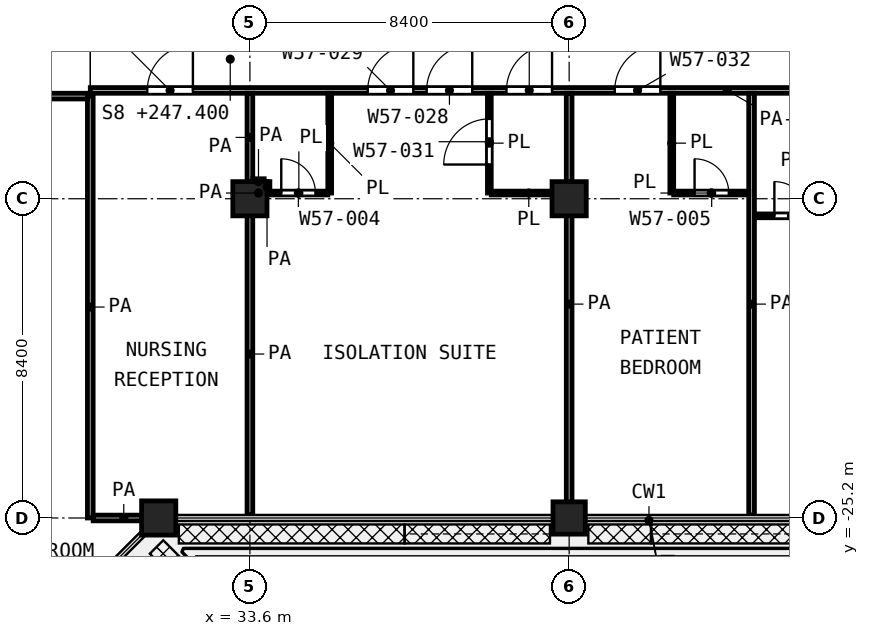
"""IFC4 building model, lengths in metres.
Left out: names, types, materials, properties, quantities, classifications, styles, units other than length and angle.
Written with IfcOpenShell. Run it as: python <this file> out.ifc"""

import sys

from ifc_helpers import new_model, si_unit, direction, frame, frame_2d, origin, origin_2d, place, context, subcontext, project, spatial, rectangle, extrude, element, fill, save


model = new_model("IFC4")
c1 = context("Model", 3, precision=1e-05, world=origin(), true_north=direction((0.0, 1.0)))
c2 = subcontext(c1, "Body", "Model", "MODEL_VIEW")
j1 = project(units=[si_unit("LENGTHUNIT", "METRE"), si_unit("PLANEANGLEUNIT", "RADIAN")], contexts=[c1])
p1 = place(None, origin())
s1 = spatial("IfcSite", under=j1, at=p1, CompositionType="ELEMENT")
p2 = place(p1, origin())
s2 = spatial("IfcBuilding", under=s1, at=p2, CompositionType="ELEMENT")
p3 = place(p2, frame((0.0, 0.0, 247.4)))
s3 = spatial("IfcBuildingStorey", under=s2, at=p3, CompositionType="ELEMENT", Elevation=247.4)
for number, where, z_axis, x_axis in (
    (1, (33.6, -16.8, 0.0), (0.0, 0.0, 1.0), (1.0, 0.0, 0.0)),
    (2, (42.0, -16.8, 0.0), (0.0, 0.0, 1.0), (1.0, 0.0, 0.0)),
    (3, (31.2, -25.2, 0.0), (0.0, 0.0, 1.0), (1.0, 0.0, 0.0)),
):
    element("IfcColumn", number, at=place(p3, frame(where, z_axis=z_axis, x_axis=x_axis)), inside=s3, PredefinedType="COLUMN", context=c2, shape_type="SweptSolid", body=[
        extrude(rectangle(XDim=0.9, YDim=0.9, at=origin_2d()), origin(), (0.0, 0.0, 1.0), 4.2),
    ])
p4 = place(p3, frame((42.0, -25.2, 0.0), z_axis=(0.0, 0.0, 1.0), x_axis=(1.0, 0.0, 0.0)))
e4 = element("IfcColumn", 4, at=p4, inside=s3, PredefinedType="COLUMN", context=c2, shape_type="SweptSolid", body=[
    extrude(rectangle(XDim=0.85, YDim=0.85, at=origin_2d()), origin(), (0.0, 0.0, 1.0), 4.2),
])
p5 = place(p3, frame((46.875, -17.25, 0.0), z_axis=(0.0, 0.0, 1.0), x_axis=(1.0, 0.0, 0.0)))
e5 = element("IfcWall", 5, at=p5, inside=s3, PredefinedType="PARTITIONING", context=c2, shape_type="SweptSolid", body=[
    extrude(rectangle(XDim=1.975, YDim=0.1, at=frame_2d((0.988, 0.0))), origin(), (0.0, 0.0, 1.0), 3.6),
])
p6 = place(p5, frame((0.525, 0.0, 0.0)))
e6 = element("IfcOpeningElement", 6, at=p6, cuts=e5, PredefinedType="OPENING", context=c2, shape_type="SweptSolid", body=[
    extrude(rectangle(XDim=0.9, YDim=2.1, at=frame_2d((0.45, 1.05))), frame((0.0, 0.06, 0.0), z_axis=(0.0, -1.0, 0.0), x_axis=(1.0, 0.0, 0.0)), (0.0, 0.0, 1.0), 0.12),
])
p7 = place(p3, frame((34.125, -16.65, 0.0), z_axis=(0.0, 0.0, 1.0), x_axis=(1.0, 0.0, 0.0)))
e7 = element("IfcWall", 7, at=p7, inside=s3, PredefinedType="PARTITIONING", context=c2, shape_type="SweptSolid", body=[
    extrude(rectangle(XDim=1.525, YDim=0.1, at=frame_2d((0.762, 0.0))), origin(), (0.0, 0.0, 1.0), 3.6),
])
p8 = place(p7, frame((0.3, 0.0, 0.0)))
e8 = element("IfcOpeningElement", 8, at=p8, cuts=e7, PredefinedType="OPENING", context=c2, shape_type="SweptSolid", body=[
    extrude(rectangle(XDim=0.9, YDim=2.1, at=frame_2d((0.45, 1.05))), frame((0.0, 0.06, 0.0), z_axis=(0.0, -1.0, 0.0), x_axis=(1.0, 0.0, 0.0)), (0.0, 0.0, 1.0), 0.12),
])
p9 = place(p3, frame((39.95, -16.65, 0.0), z_axis=(0.0, 0.0, 1.0), x_axis=(1.0, 0.0, 0.0)))
e9 = element("IfcWall", 9, at=p9, inside=s3, PredefinedType="PARTITIONING", context=c2, shape_type="SweptSolid", body=[
    extrude(rectangle(XDim=1.975, YDim=0.1, at=frame_2d((0.988, 0.0))), origin(), (0.0, 0.0, 1.0), 3.6),
])
p10 = place(p3, frame((44.75, -16.65, 0.0), z_axis=(0.0, 0.0, 1.0), x_axis=(1.0, 0.0, 0.0)))
e10 = element("IfcWall", 10, at=p10, inside=s3, PredefinedType="PARTITIONING", context=c2, shape_type="SweptSolid", body=[
    extrude(rectangle(XDim=1.975, YDim=0.1, at=frame_2d((0.988, 0.0))), origin(), (0.0, 0.0, 1.0), 3.6),
])
p11 = place(p10, frame((0.55, 0.0, 0.0)))
e11 = element("IfcOpeningElement", 11, at=p11, cuts=e10, PredefinedType="OPENING", context=c2, shape_type="SweptSolid", body=[
    extrude(rectangle(XDim=0.9, YDim=2.1, at=frame_2d((0.45, 1.05))), frame((0.0, 0.06, 0.0), z_axis=(0.0, -1.0, 0.0), x_axis=(1.0, 0.0, 0.0)), (0.0, 0.0, 1.0), 0.12),
])
p12 = place(p3, frame((35.7, -16.65, 0.0), z_axis=(0.0, 0.0, 1.0), x_axis=(0.0, 1.0, 0.0)))
e12 = element("IfcWall", 12, at=p12, inside=s3, PredefinedType="PARTITIONING", context=c2, shape_type="SweptSolid", body=[
    extrude(rectangle(XDim=2.625, YDim=0.1, at=frame_2d((1.312, 0.0))), origin(), (0.0, 0.0, 1.0), 3.6),
])
p13 = place(p3, frame((39.9, -16.65, 0.0), z_axis=(0.0, 0.0, 1.0), x_axis=(0.0, 1.0, 0.0)))
e13 = element("IfcWall", 13, at=p13, inside=s3, PredefinedType="PARTITIONING", context=c2, shape_type="SweptSolid", body=[
    extrude(rectangle(XDim=2.625, YDim=0.1, at=frame_2d((1.312, 0.0))), origin(), (0.0, 0.0, 1.0), 3.6),
])
p14 = place(p13, frame((0.75, 0.0, 0.0)))
e14 = element("IfcOpeningElement", 14, at=p14, cuts=e13, PredefinedType="OPENING", context=c2, shape_type="SweptSolid", body=[
    extrude(rectangle(XDim=1.2, YDim=2.1, at=frame_2d((0.6, 1.05))), frame((0.0, 0.06, 0.0), z_axis=(0.0, -1.0, 0.0), x_axis=(1.0, 0.0, 0.0)), (0.0, 0.0, 1.0), 0.12),
])
p15 = place(p3, frame((44.7, -16.65, 0.0), z_axis=(0.0, 0.0, 1.0), x_axis=(0.0, 1.0, 0.0)))
e15 = element("IfcWall", 15, at=p15, inside=s3, PredefinedType="PARTITIONING", context=c2, shape_type="SweptSolid", body=[
    extrude(rectangle(XDim=2.625, YDim=0.1, at=frame_2d((1.312, 0.0))), origin(), (0.0, 0.0, 1.0), 3.6),
])
p16 = place(p3, frame((29.475, -25.2, 0.0), z_axis=(0.0, 0.0, 1.0), x_axis=(1.0, 0.0, 0.0)))
e16 = element("IfcWall", 16, at=p16, inside=s3, PredefinedType="PARTITIONING", context=c2, shape_type="SweptSolid", body=[
    extrude(rectangle(XDim=1.612, YDim=0.15, at=frame_2d((0.806, 0.0))), origin(), (0.0, 0.0, 1.0), 3.6),
])
for number, where, z_axis, x_axis in (
    (17, (33.677, -16.65, 0.0), (0.0, 0.0, 1.0), (1.0, 0.0, 0.0)),
    (18, (33.677, -16.35, 0.0), (0.0, 0.0, 1.0), (1.0, 0.0, 0.0)),
):
    element("IfcWall", number, at=place(p3, frame(where, z_axis=z_axis, x_axis=x_axis)), inside=s3, PredefinedType="PARTITIONING", context=c2, shape_type="SweptSolid", body=[
        extrude(rectangle(XDim=0.298, YDim=0.15, at=frame_2d((0.149, 0.0))), origin(), (0.0, 0.0, 1.0), 3.6),
    ])
p17 = place(p3, frame((24.8, -14.1, 0.0), z_axis=(0.0, 0.0, 1.0), x_axis=(1.0, 0.0, 0.0)))
e19 = element("IfcWall", 19, at=p17, inside=s3, PredefinedType="PARTITIONING", context=c2, shape_type="SweptSolid", body=[
    extrude(rectangle(XDim=4.525, YDim=0.15, at=frame_2d((2.262, 0.0))), origin(), (0.0, 0.0, 1.0), 3.6),
])
p18 = place(p17, frame((1.75, 0.0, 0.0)))
e20 = element("IfcOpeningElement", 20, at=p18, cuts=e19, PredefinedType="OPENING", context=c2, shape_type="SweptSolid", body=[
    extrude(rectangle(XDim=1.5, YDim=2.1, at=frame_2d((0.75, 1.05))), frame((0.0, 0.085, 0.0), z_axis=(0.0, -1.0, 0.0), x_axis=(1.0, 0.0, 0.0)), (0.0, 0.0, 1.0), 0.17),
])
p19 = place(p3, frame((29.4, -13.95, 0.0), z_axis=(0.0, 0.0, 1.0), x_axis=(1.0, 0.0, 0.0)))
e21 = element("IfcWall", 21, at=p19, inside=s3, PredefinedType="PARTITIONING", context=c2, shape_type="SweptSolid", body=[
    extrude(rectangle(XDim=33.52, YDim=0.15, at=frame_2d((16.76, 0.0))), origin(), (0.0, 0.0, 1.0), 2.7),
])
p20 = place(p19, frame((1.5, 0.0, 0.0)))
e22 = element("IfcOpeningElement", 22, at=p20, cuts=e21, PredefinedType="OPENING", context=c2, shape_type="SweptSolid", body=[
    extrude(rectangle(XDim=1.2, YDim=2.1, at=frame_2d((0.6, 1.05))), frame((0.0, 0.085, 0.0), z_axis=(0.0, -1.0, 0.0), x_axis=(1.0, 0.0, 0.0)), (0.0, 0.0, 1.0), 0.17),
])
p21 = place(p19, frame((8.85, 0.0, 0.0)))
e23 = element("IfcOpeningElement", 23, at=p21, cuts=e21, PredefinedType="OPENING", context=c2, shape_type="SweptSolid", body=[
    extrude(rectangle(XDim=1.2, YDim=2.1, at=frame_2d((0.6, 1.05))), frame((0.0, 0.085, 0.0), z_axis=(0.0, -1.0, 0.0), x_axis=(1.0, 0.0, 0.0)), (0.0, 0.0, 1.0), 0.17),
])
p22 = place(p19, frame((7.3, 0.0, 0.0)))
e24 = element("IfcOpeningElement", 24, at=p22, cuts=e21, PredefinedType="OPENING", context=c2, shape_type="SweptSolid", body=[
    extrude(rectangle(XDim=1.2, YDim=2.1, at=frame_2d((0.6, 1.05))), frame((0.0, 0.085, 0.0), z_axis=(0.0, -1.0, 0.0), x_axis=(1.0, 0.0, 0.0)), (0.0, 0.0, 1.0), 0.17),
])
p23 = place(p19, frame((10.95, 0.0, 0.0)))
e25 = element("IfcOpeningElement", 25, at=p23, cuts=e21, PredefinedType="OPENING", context=c2, shape_type="SweptSolid", body=[
    extrude(rectangle(XDim=1.2, YDim=2.1, at=frame_2d((0.6, 1.05))), frame((0.0, 0.085, 0.0), z_axis=(0.0, -1.0, 0.0), x_axis=(1.0, 0.0, 0.0)), (0.0, 0.0, 1.0), 0.17),
])
p24 = place(p19, frame((13.8, 0.0, 0.0)))
e26 = element("IfcOpeningElement", 26, at=p24, cuts=e21, PredefinedType="OPENING", context=c2, shape_type="SweptSolid", body=[
    extrude(rectangle(XDim=1.2, YDim=2.1, at=frame_2d((0.6, 1.05))), frame((0.0, 0.085, 0.0), z_axis=(0.0, -1.0, 0.0), x_axis=(1.0, 0.0, 0.0)), (0.0, 0.0, 1.0), 0.17),
])
p25 = place(p19, frame((19.7, 0.0, 0.0)))
e27 = element("IfcOpeningElement", 27, at=p25, cuts=e21, PredefinedType="OPENING", context=c2, shape_type="SweptSolid", body=[
    extrude(rectangle(XDim=1.1, YDim=2.1, at=frame_2d((0.55, 1.05))), frame((0.0, 0.085, 0.0), z_axis=(0.0, -1.0, 0.0), x_axis=(1.0, 0.0, 0.0)), (0.0, 0.0, 1.0), 0.17),
])
p26 = place(p19, frame((25.65, 0.0, 0.0)))
e28 = element("IfcOpeningElement", 28, at=p26, cuts=e21, PredefinedType="OPENING", context=c2, shape_type="SweptSolid", body=[
    extrude(rectangle(XDim=1.2, YDim=2.1, at=frame_2d((0.6, 1.05))), frame((0.0, 0.085, 0.0), z_axis=(0.0, -1.0, 0.0), x_axis=(1.0, 0.0, 0.0)), (0.0, 0.0, 1.0), 0.17),
])
p27 = place(p19, frame((24.1, 0.0, 0.0)))
e29 = element("IfcOpeningElement", 29, at=p27, cuts=e21, PredefinedType="OPENING", context=c2, shape_type="SweptSolid", body=[
    extrude(rectangle(XDim=1.2, YDim=2.1, at=frame_2d((0.6, 1.05))), frame((0.0, 0.085, 0.0), z_axis=(0.0, -1.0, 0.0), x_axis=(1.0, 0.0, 0.0)), (0.0, 0.0, 1.0), 0.17),
])
p28 = place(p19, frame((27.75, 0.0, 0.0)))
e30 = element("IfcOpeningElement", 30, at=p28, cuts=e21, PredefinedType="OPENING", context=c2, shape_type="SweptSolid", body=[
    extrude(rectangle(XDim=1.2, YDim=2.1, at=frame_2d((0.6, 1.05))), frame((0.0, 0.085, 0.0), z_axis=(0.0, -1.0, 0.0), x_axis=(1.0, 0.0, 0.0)), (0.0, 0.0, 1.0), 0.17),
])
p29 = place(p19, frame((31.0, 0.0, 0.0)))
e31 = element("IfcOpeningElement", 31, at=p29, cuts=e21, PredefinedType="OPENING", context=c2, shape_type="SweptSolid", body=[
    extrude(rectangle(XDim=1.0, YDim=2.1, at=frame_2d((0.5, 1.05))), frame((0.0, 0.085, 0.0), z_axis=(0.0, -1.0, 0.0), x_axis=(1.0, 0.0, 0.0)), (0.0, 0.0, 1.0), 0.17),
])
p30 = place(p3, frame((29.4, -25.2, 0.0), z_axis=(0.0, 0.0, 1.0), x_axis=(0.0, 1.0, 0.0)))
e32 = element("IfcWall", 32, at=p30, inside=s3, PredefinedType="PARTITIONING", context=c2, shape_type="SweptSolid", body=[
    extrude(rectangle(XDim=11.1, YDim=0.15, at=frame_2d((5.55, 0.0))), origin(), (0.0, 0.0, 1.0), 3.6),
])
p31 = place(p3, frame((33.6, -25.12, 0.0), z_axis=(0.0, 0.0, 1.0), x_axis=(0.0, 1.0, 0.0)))
e33 = element("IfcWall", 33, at=p31, inside=s3, PredefinedType="PARTITIONING", context=c2, shape_type="SweptSolid", body=[
    extrude(rectangle(XDim=8.468, YDim=0.15, at=frame_2d((4.234, 0.0))), origin(), (0.0, 0.0, 1.0), 3.6),
])
p32 = place(p3, frame((33.6, -16.348, 0.0), z_axis=(0.0, 0.0, 1.0), x_axis=(0.0, 1.0, 0.0)))
e34 = element("IfcWall", 34, at=p32, inside=s3, PredefinedType="PARTITIONING", context=c2, shape_type="SweptSolid", body=[
    extrude(rectangle(XDim=2.323, YDim=0.15, at=frame_2d((1.162, 0.0))), origin(), (0.0, 0.0, 1.0), 3.6),
])
p33 = place(p3, frame((34.05, -16.65, 0.0), z_axis=(0.0, 0.0, 1.0), x_axis=(0.0, 1.0, 0.0)))
e35 = element("IfcWall", 35, at=p33, inside=s3, PredefinedType="PARTITIONING", context=c2, shape_type="SweptSolid", body=[
    extrude(rectangle(XDim=0.3, YDim=0.15, at=frame_2d((0.15, 0.0))), origin(), (0.0, 0.0, 1.0), 3.6),
])
for number, where, z_axis, x_axis in (
    (36, (42.0, -25.12, 0.0), (0.0, 0.0, 1.0), (0.0, 1.0, 0.0)),
    (37, (46.8, -25.12, 0.0), (0.0, 0.0, 1.0), (0.0, 1.0, 0.0)),
):
    element("IfcWall", number, at=place(p3, frame(where, z_axis=z_axis, x_axis=x_axis)), inside=s3, PredefinedType="PARTITIONING", context=c2, shape_type="SweptSolid", body=[
        extrude(rectangle(XDim=11.095, YDim=0.15, at=frame_2d((5.548, 0.0))), origin(), (0.0, 0.0, 1.0), 3.6),
    ])
p34 = place(p20, origin())
e38 = element("IfcDoor", 38, at=p34, inside=s3, OperationType="SINGLE_SWING_RIGHT", PredefinedType="DOOR", context=c2, shape_type="SweptSolid", body=[
    extrude(rectangle(XDim=1.2, YDim=2.1, at=frame_2d((0.6, 1.05))), frame((0.0, 0.025, 0.0), z_axis=(0.0, -1.0, 0.0), x_axis=(1.0, 0.0, 0.0)), (0.0, 0.0, 1.0), 0.05),
])
fill(e22, e38)
p35 = place(p21, origin())
e39 = element("IfcDoor", 39, at=p35, inside=s3, OperationType="SINGLE_SWING_RIGHT", PredefinedType="DOOR", context=c2, shape_type="SweptSolid", body=[
    extrude(rectangle(XDim=1.2, YDim=2.1, at=frame_2d((0.6, 1.05))), frame((0.0, 0.025, 0.0), z_axis=(0.0, -1.0, 0.0), x_axis=(1.0, 0.0, 0.0)), (0.0, 0.0, 1.0), 0.05),
])
fill(e23, e39)
p36 = place(p22, origin())
e40 = element("IfcDoor", 40, at=p36, inside=s3, OperationType="SINGLE_SWING_RIGHT", PredefinedType="DOOR", context=c2, shape_type="SweptSolid", body=[
    extrude(rectangle(XDim=1.2, YDim=2.1, at=frame_2d((0.6, 1.05))), frame((0.0, 0.025, 0.0), z_axis=(0.0, -1.0, 0.0), x_axis=(1.0, 0.0, 0.0)), (0.0, 0.0, 1.0), 0.05),
])
fill(e24, e40)
p37 = place(p23, origin())
e41 = element("IfcDoor", 41, at=p37, inside=s3, OperationType="SINGLE_SWING_RIGHT", PredefinedType="DOOR", context=c2, shape_type="SweptSolid", body=[
    extrude(rectangle(XDim=1.2, YDim=2.1, at=frame_2d((0.6, 1.05))), frame((0.0, 0.025, 0.0), z_axis=(0.0, -1.0, 0.0), x_axis=(1.0, 0.0, 0.0)), (0.0, 0.0, 1.0), 0.05),
])
fill(e25, e41)
p38 = place(p14, origin())
e42 = element("IfcDoor", 42, at=p38, inside=s3, OperationType="SINGLE_SWING_LEFT", PredefinedType="DOOR", context=c2, shape_type="SweptSolid", body=[
    extrude(rectangle(XDim=1.2, YDim=2.1, at=frame_2d((0.6, 1.05))), frame((0.0, 0.025, 0.0), z_axis=(0.0, -1.0, 0.0), x_axis=(1.0, 0.0, 0.0)), (0.0, 0.0, 1.0), 0.05),
])
fill(e14, e42)
p39 = place(p8, origin())
e43 = element("IfcDoor", 43, at=p39, inside=s3, OperationType="SINGLE_SWING_LEFT", PredefinedType="DOOR", context=c2, shape_type="SweptSolid", body=[
    extrude(rectangle(XDim=0.9, YDim=2.1, at=frame_2d((0.45, 1.05))), frame((0.0, 0.025, 0.0), z_axis=(0.0, -1.0, 0.0), x_axis=(1.0, 0.0, 0.0)), (0.0, 0.0, 1.0), 0.05),
])
fill(e8, e43)
p40 = place(p24, origin())
e44 = element("IfcDoor", 44, at=p40, inside=s3, OperationType="SINGLE_SWING_RIGHT", PredefinedType="DOOR", context=c2, shape_type="SweptSolid", body=[
    extrude(rectangle(XDim=1.2, YDim=2.1, at=frame_2d((0.6, 1.05))), frame((0.0, 0.025, 0.0), z_axis=(0.0, -1.0, 0.0), x_axis=(1.0, 0.0, 0.0)), (0.0, 0.0, 1.0), 0.05),
])
fill(e26, e44)
p41 = place(p11, origin())
e45 = element("IfcDoor", 45, at=p41, inside=s3, OperationType="SINGLE_SWING_LEFT", PredefinedType="DOOR", context=c2, shape_type="SweptSolid", body=[
    extrude(rectangle(XDim=0.9, YDim=2.1, at=frame_2d((0.45, 1.05))), frame((0.0, 0.025, 0.0), z_axis=(0.0, -1.0, 0.0), x_axis=(1.0, 0.0, 0.0)), (0.0, 0.0, 1.0), 0.05),
])
fill(e11, e45)
p42 = place(p6, origin())
e46 = element("IfcDoor", 46, at=p42, inside=s3, OperationType="SINGLE_SWING_LEFT", PredefinedType="DOOR", context=c2, shape_type="SweptSolid", body=[
    extrude(rectangle(XDim=0.9, YDim=2.1, at=frame_2d((0.45, 1.05))), frame((0.0, 0.025, 0.0), z_axis=(0.0, -1.0, 0.0), x_axis=(1.0, 0.0, 0.0)), (0.0, 0.0, 1.0), 0.05),
])
fill(e6, e46)
save(model, sys.argv[1])
